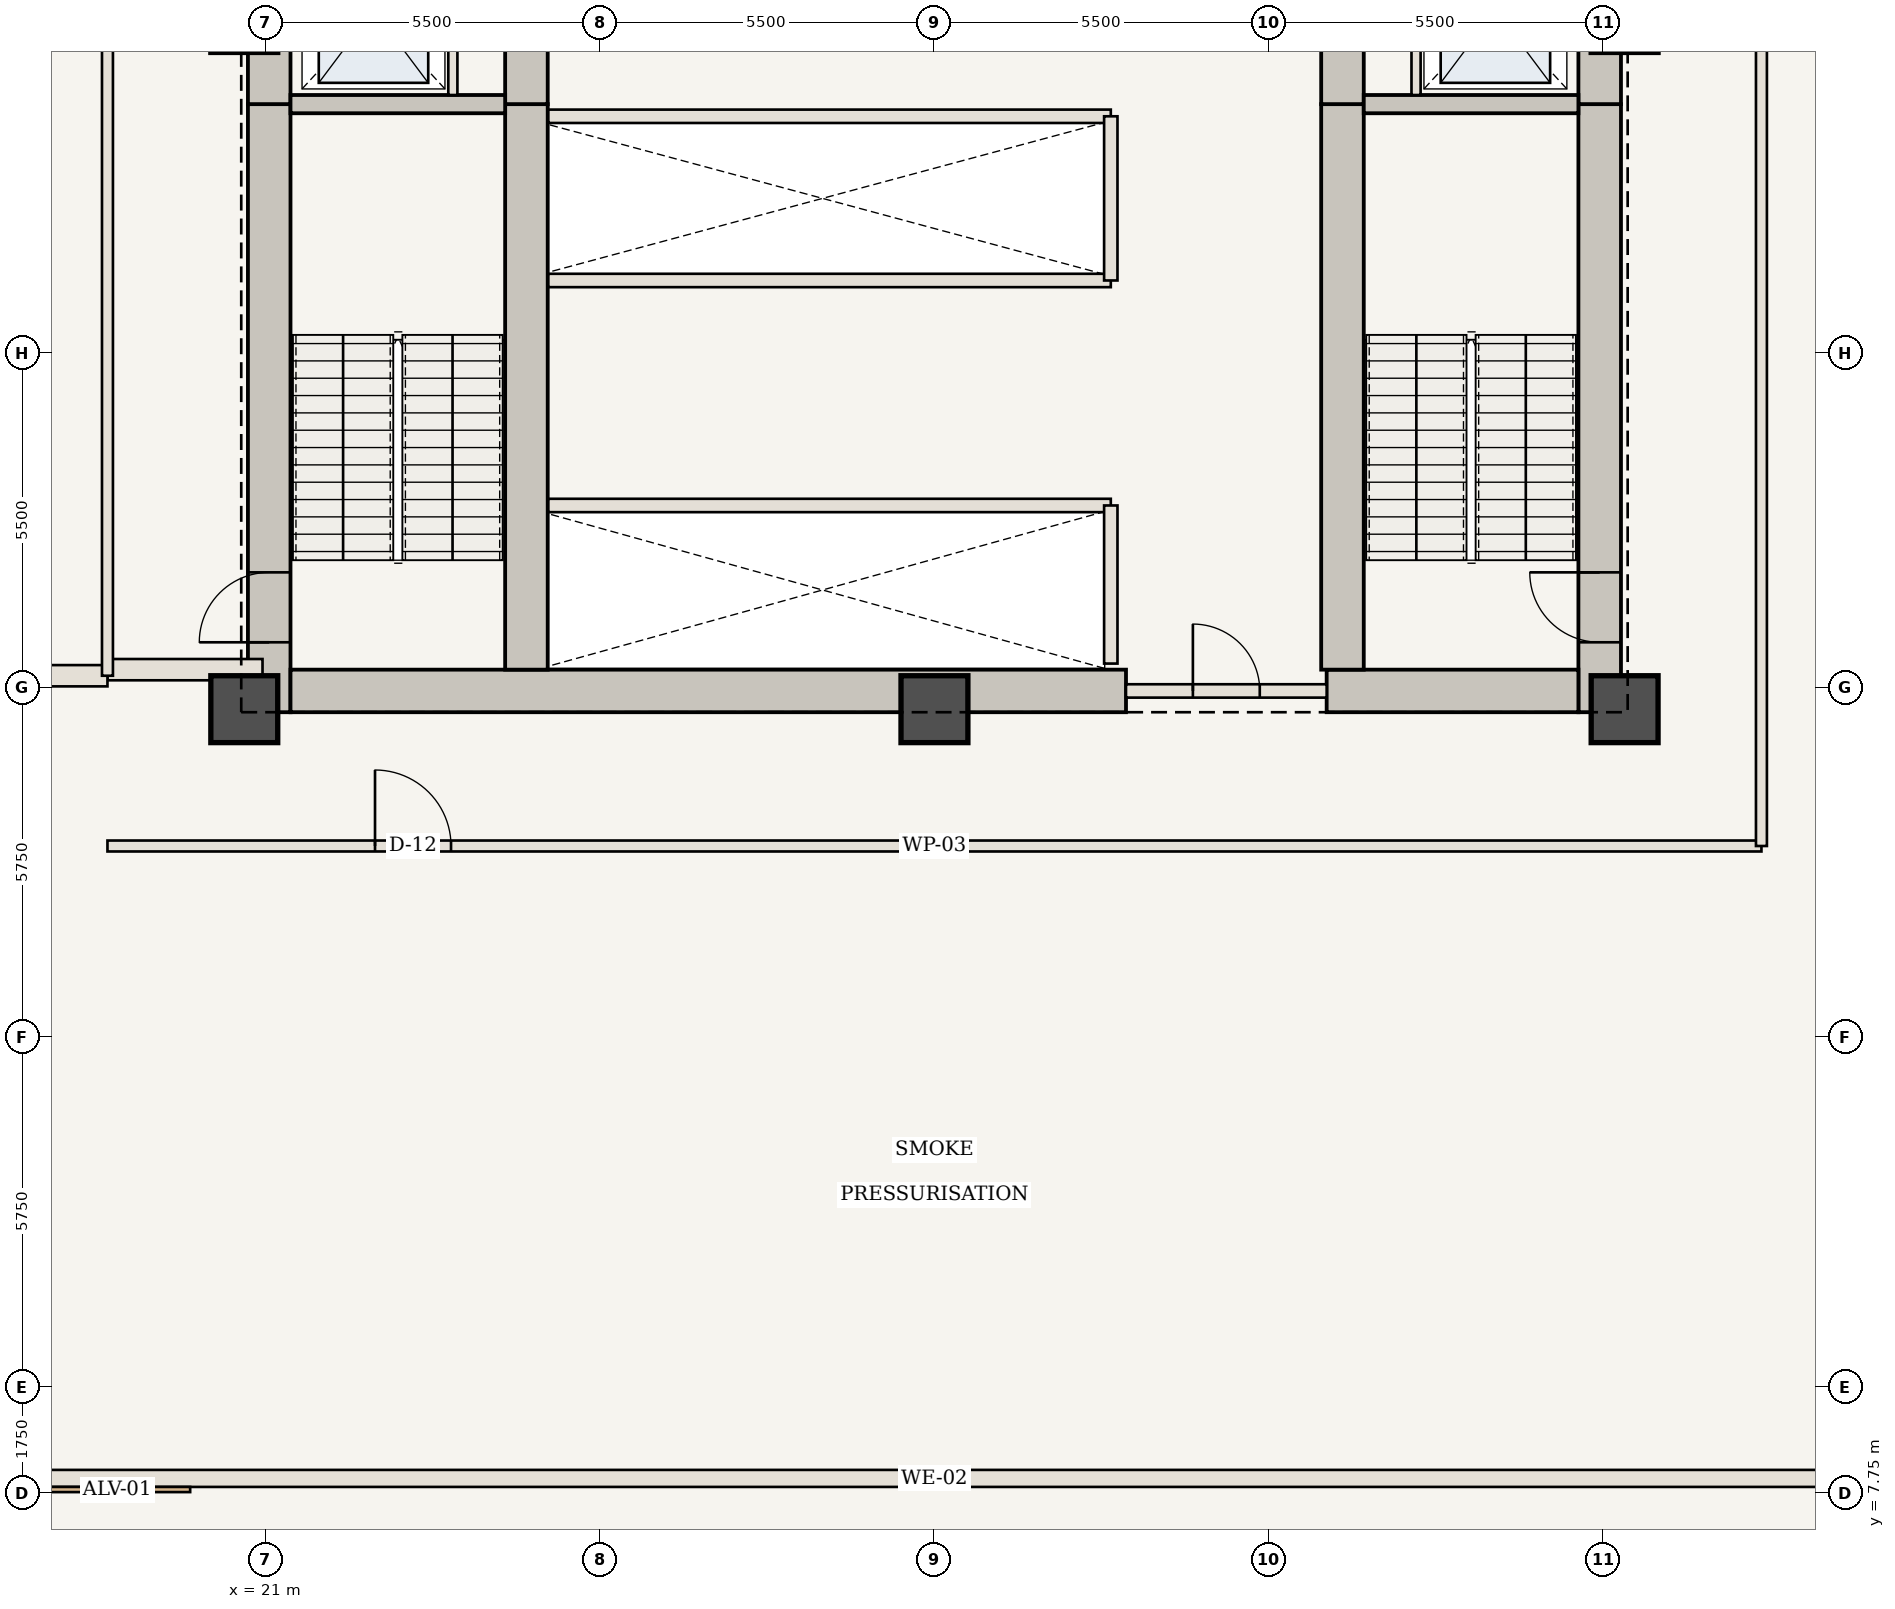
"""IFC4 building model, lengths in metres.
Left out: names, types, materials, properties, quantities, classifications, styles, units other than length and angle.
Written with IfcOpenShell. Run it as: python <this file> out.ifc"""

import sys

from ifc_helpers import new_model, si_unit, direction, frame, frame_2d, origin, origin_2d, place, context, subcontext, project, spatial, rectangle, extrude, element, fill, save


model = new_model("IFC4")
c1 = context("Model", 3, precision=1e-05, world=origin(), true_north=direction((0.0, 1.0)))
c2 = subcontext(c1, "Body", "Model", "MODEL_VIEW")
j1 = project(units=[si_unit("LENGTHUNIT", "METRE"), si_unit("PLANEANGLEUNIT", "RADIAN")], contexts=[c1])
p1 = place(None, origin())
s1 = spatial("IfcSite", under=j1, at=p1, CompositionType="ELEMENT")
p2 = place(p1, origin())
s2 = spatial("IfcBuilding", under=s1, at=p2, CompositionType="ELEMENT")
p3 = place(p2, frame((0.0, 0.0, 77.35)))
s3 = spatial("IfcBuildingStorey", under=s2, at=p3, CompositionType="ELEMENT", Elevation=77.35)
p4 = place(p3, frame((21.06, 20.6, 0.0), z_axis=(0.0, 0.0, 1.0), x_axis=(0.0, 1.0, 0.0)))
e1 = element("IfcWall", 1, at=p4, inside=s3, PredefinedType="SHEAR", context=c2, shape_type="SweptSolid", body=[
    extrude(rectangle(XDim=10.0, YDim=0.7, at=frame_2d((5.0, 0.0))), origin(), (0.0, 0.0, 1.0), 4.9),
])
p5 = place(p4, frame((1.15, 0.0, 0.0)))
e2 = element("IfcOpeningElement", 2, at=p5, cuts=e1, PredefinedType="OPENING", context=c2, shape_type="SweptSolid", body=[
    extrude(rectangle(XDim=1.15, YDim=2.15, at=frame_2d((0.575, 1.075))), frame((0.0, 0.36, 0.0), z_axis=(0.0, -1.0, 0.0), x_axis=(1.0, 0.0, 0.0)), (0.0, 0.0, 1.0), 0.72),
])
p6 = place(p3, frame((21.06, 30.6, 0.0), z_axis=(0.0, 0.0, 1.0), x_axis=(0.0, 1.0, 0.0)))
e3 = element("IfcWall", 3, at=p6, inside=s3, PredefinedType="SHEAR", context=c2, shape_type="SweptSolid", body=[
    extrude(rectangle(XDim=12.75, YDim=0.7, at=frame_2d((6.375, 0.0))), origin(), (0.0, 0.0, 1.0), 4.9),
])
p7 = place(p6, frame((4.2, 0.0, 0.0)))
e4 = element("IfcOpeningElement", 4, at=p7, cuts=e3, PredefinedType="OPENING", context=c2, shape_type="SweptSolid", body=[
    extrude(rectangle(XDim=1.1, YDim=2.15, at=frame_2d((0.55, 1.075))), frame((0.0, 0.36, 0.0), z_axis=(0.0, -1.0, 0.0), x_axis=(1.0, 0.0, 0.0)), (0.0, 0.0, 1.0), 0.72),
])
p8 = place(p6, frame((9.2, 0.0, 0.0)))
e5 = element("IfcOpeningElement", 5, at=p8, cuts=e3, PredefinedType="OPENING", context=c2, shape_type="SweptSolid", body=[
    extrude(rectangle(XDim=0.92, YDim=2.1, at=frame_2d((0.46, 1.05))), frame((0.0, 0.36, 0.0), z_axis=(0.0, -1.0, 0.0), x_axis=(1.0, 0.0, 0.0)), (0.0, 0.0, 1.0), 0.72),
])
p9 = place(p3, frame((42.94, 20.6, 0.0), z_axis=(0.0, 0.0, 1.0), x_axis=(0.0, 1.0, 0.0)))
e6 = element("IfcWall", 6, at=p9, inside=s3, PredefinedType="SHEAR", context=c2, shape_type="SweptSolid", body=[
    extrude(rectangle(XDim=10.0, YDim=0.7, at=frame_2d((5.0, 0.0))), origin(), (0.0, 0.0, 1.0), 4.9),
])
p10 = place(p9, frame((1.15, 0.0, 0.0)))
e7 = element("IfcOpeningElement", 7, at=p10, cuts=e6, PredefinedType="OPENING", context=c2, shape_type="SweptSolid", body=[
    extrude(rectangle(XDim=1.15, YDim=2.15, at=frame_2d((0.575, 1.075))), frame((0.0, 0.36, 0.0), z_axis=(0.0, -1.0, 0.0), x_axis=(1.0, 0.0, 0.0)), (0.0, 0.0, 1.0), 0.72),
])
p11 = place(p3, frame((42.94, 30.6, 0.0), z_axis=(0.0, 0.0, 1.0), x_axis=(0.0, 1.0, 0.0)))
e8 = element("IfcWall", 8, at=p11, inside=s3, PredefinedType="SHEAR", context=c2, shape_type="SweptSolid", body=[
    extrude(rectangle(XDim=12.75, YDim=0.7, at=frame_2d((6.375, 0.0))), origin(), (0.0, 0.0, 1.0), 4.9),
])
p12 = place(p11, frame((4.2, 0.0, 0.0)))
e9 = element("IfcOpeningElement", 9, at=p12, cuts=e8, PredefinedType="OPENING", context=c2, shape_type="SweptSolid", body=[
    extrude(rectangle(XDim=1.1, YDim=2.15, at=frame_2d((0.55, 1.075))), frame((0.0, 0.36, 0.0), z_axis=(0.0, -1.0, 0.0), x_axis=(1.0, 0.0, 0.0)), (0.0, 0.0, 1.0), 0.72),
])
p13 = place(p11, frame((8.4, 0.0, 0.0)))
e10 = element("IfcOpeningElement", 10, at=p13, cuts=e8, PredefinedType="OPENING", context=c2, shape_type="SweptSolid", body=[
    extrude(rectangle(XDim=0.88, YDim=2.1, at=frame_2d((0.44, 1.05))), frame((0.0, 0.36, 0.0), z_axis=(0.0, -1.0, 0.0), x_axis=(1.0, 0.0, 0.0)), (0.0, 0.0, 1.0), 0.72),
])
p14 = place(p11, frame((10.5, 0.0, 0.0)))
e11 = element("IfcOpeningElement", 11, at=p14, cuts=e8, PredefinedType="OPENING", context=c2, shape_type="SweptSolid", body=[
    extrude(rectangle(XDim=0.88, YDim=2.1, at=frame_2d((0.44, 1.05))), frame((0.0, 0.36, 0.0), z_axis=(0.0, -1.0, 0.0), x_axis=(1.0, 0.0, 0.0)), (0.0, 0.0, 1.0), 0.72),
])
p15 = place(p3, frame((21.41, 20.95, 0.0), z_axis=(0.0, 0.0, 1.0), x_axis=(1.0, 0.0, 0.0)))
e12 = element("IfcWall", 12, at=p15, inside=s3, PredefinedType="SHEAR", context=c2, shape_type="SweptSolid", body=[
    extrude(rectangle(XDim=13.74, YDim=0.7, at=frame_2d((6.87, 0.0))), origin(), (0.0, 0.0, 1.0), 4.9),
])
p16 = place(p3, frame((38.45, 20.95, 0.0), z_axis=(0.0, 0.0, 1.0), x_axis=(1.0, 0.0, 0.0)))
e13 = element("IfcWall", 13, at=p16, inside=s3, PredefinedType="SHEAR", context=c2, shape_type="SweptSolid", body=[
    extrude(rectangle(XDim=4.14, YDim=0.7, at=frame_2d((2.07, 0.0))), origin(), (0.0, 0.0, 1.0), 4.9),
])
p17 = place(p3, frame((25.29, 21.3, 0.0), z_axis=(0.0, 0.0, 1.0), x_axis=(0.0, 1.0, 0.0)))
e14 = element("IfcWall", 14, at=p17, inside=s3, PredefinedType="SHEAR", context=c2, shape_type="SweptSolid", body=[
    extrude(rectangle(XDim=9.3, YDim=0.7, at=frame_2d((4.65, 0.0))), origin(), (0.0, 0.0, 1.0), 4.9),
])
p18 = place(p3, frame((25.29, 30.6, 0.0), z_axis=(0.0, 0.0, 1.0), x_axis=(0.0, 1.0, 0.0)))
e15 = element("IfcWall", 15, at=p18, inside=s3, PredefinedType="SHEAR", context=c2, shape_type="SweptSolid", body=[
    extrude(rectangle(XDim=12.05, YDim=0.7, at=frame_2d((6.025, 0.0))), origin(), (0.0, 0.0, 1.0), 4.9),
])
p19 = place(p18, frame((6.25, 0.0, 0.0)))
e16 = element("IfcOpeningElement", 16, at=p19, cuts=e15, PredefinedType="OPENING", context=c2, shape_type="SweptSolid", body=[
    extrude(rectangle(XDim=1.1, YDim=2.15, at=frame_2d((0.55, 1.075))), frame((0.0, 0.36, 0.0), z_axis=(0.0, -1.0, 0.0), x_axis=(1.0, 0.0, 0.0)), (0.0, 0.0, 1.0), 0.72),
])
p20 = place(p3, frame((38.71, 21.3, 0.0), z_axis=(0.0, 0.0, 1.0), x_axis=(0.0, 1.0, 0.0)))
e17 = element("IfcWall", 17, at=p20, inside=s3, PredefinedType="SHEAR", context=c2, shape_type="SweptSolid", body=[
    extrude(rectangle(XDim=9.3, YDim=0.7, at=frame_2d((4.65, 0.0))), origin(), (0.0, 0.0, 1.0), 4.9),
])
p21 = place(p3, frame((38.71, 30.6, 0.0), z_axis=(0.0, 0.0, 1.0), x_axis=(0.0, 1.0, 0.0)))
e18 = element("IfcWall", 18, at=p21, inside=s3, PredefinedType="SHEAR", context=c2, shape_type="SweptSolid", body=[
    extrude(rectangle(XDim=12.05, YDim=0.7, at=frame_2d((6.025, 0.0))), origin(), (0.0, 0.0, 1.0), 4.9),
])
for number, where, z_axis, x_axis in (
    (19, (20.65, 20.65, 0.0), (0.0, 0.0, 1.0), (1.0, 0.0, 0.0)),
    (20, (32.0, 20.65, 0.0), (0.0, 0.0, 1.0), (1.0, 0.0, 0.0)),
    (21, (43.35, 20.65, 0.0), (0.0, 0.0, 1.0), (1.0, 0.0, 0.0)),
):
    element("IfcColumn", number, at=place(p3, frame(where, z_axis=z_axis, x_axis=x_axis)), inside=s3, PredefinedType="COLUMN", context=c2, shape_type="SweptSolid", body=[
        extrude(rectangle(XDim=1.1, YDim=1.1, at=origin_2d()), origin(), (0.0, 0.0, 1.0), 4.9),
    ])
for number, where, z_axis, x_axis in (
    (22, (21.41, 30.6, 0.0), (0.0, 0.0, 1.0), (1.0, 0.0, 0.0)),
    (23, (39.06, 30.6, 0.0), (0.0, 0.0, 1.0), (1.0, 0.0, 0.0)),
):
    element("IfcWall", number, at=place(p3, frame(where, z_axis=z_axis, x_axis=x_axis)), inside=s3, PredefinedType="SHEAR", context=c2, shape_type="SweptSolid", body=[
        extrude(rectangle(XDim=3.53, YDim=0.3, at=frame_2d((1.765, 0.0))), origin(), (0.0, 0.0, 1.0), 4.72),
    ])
for number, where, z_axis, x_axis in (
    (24, (24.08, 30.75, 0.0), (0.0, 0.0, 1.0), (0.0, 1.0, 0.0)),
    (25, (39.92, 30.75, 0.0), (0.0, 0.0, 1.0), (0.0, 1.0, 0.0)),
):
    element("IfcWall", number, at=place(p3, frame(where, z_axis=z_axis, x_axis=x_axis)), inside=s3, PredefinedType="STANDARD", context=c2, shape_type="SweptSolid", body=[
        extrude(rectangle(XDim=2.65, YDim=0.15, at=frame_2d((1.325, 0.0))), origin(), (0.0, 0.0, 1.0), 4.72),
    ])
p22 = place(p3, frame((35.15, 20.95, 0.0), z_axis=(0.0, 0.0, 1.0), x_axis=(1.0, 0.0, 0.0)))
e26 = element("IfcWall", 26, at=p22, inside=s3, PredefinedType="STANDARD", context=c2, shape_type="SweptSolid", body=[
    extrude(rectangle(XDim=3.3, YDim=0.22, at=frame_2d((1.65, 0.0))), origin(), (0.0, 0.0, 1.0), 4.72),
])
p23 = place(p22, frame((1.1, 0.0, 0.0)))
e27 = element("IfcOpeningElement", 27, at=p23, cuts=e26, PredefinedType="OPENING", context=c2, shape_type="SweptSolid", body=[
    extrude(rectangle(XDim=1.1, YDim=2.15, at=frame_2d((0.55, 1.075))), frame((0.0, 0.12, 0.0), z_axis=(0.0, -1.0, 0.0), x_axis=(1.0, 0.0, 0.0)), (0.0, 0.0, 1.0), 0.24),
])
p24 = place(p3, frame((25.65, 24.0, 0.0), z_axis=(0.0, 0.0, 1.0), x_axis=(1.0, 0.0, 0.0)))
e28 = element("IfcWall", 28, at=p24, inside=s3, PredefinedType="STANDARD", context=c2, shape_type="SweptSolid", body=[
    extrude(rectangle(XDim=9.25, YDim=0.22, at=frame_2d((4.625, 0.0))), origin(), (0.0, 0.0, 1.0), 4.72),
])
p25 = place(p3, frame((34.9, 21.4, 0.0), z_axis=(0.0, 0.0, 1.0), x_axis=(0.0, 1.0, 0.0)))
e29 = element("IfcWall", 29, at=p25, inside=s3, PredefinedType="STANDARD", context=c2, shape_type="SweptSolid", body=[
    extrude(rectangle(XDim=2.6, YDim=0.22, at=frame_2d((1.3, 0.0))), origin(), (0.0, 0.0, 1.0), 4.72),
])
for number, where, z_axis, x_axis in (
    (30, (25.65, 27.7, 0.0), (0.0, 0.0, 1.0), (1.0, 0.0, 0.0)),
    (31, (25.65, 30.4, 0.0), (0.0, 0.0, 1.0), (1.0, 0.0, 0.0)),
):
    element("IfcWall", number, at=place(p3, frame(where, z_axis=z_axis, x_axis=x_axis)), inside=s3, PredefinedType="STANDARD", context=c2, shape_type="SweptSolid", body=[
        extrude(rectangle(XDim=9.25, YDim=0.22, at=frame_2d((4.625, 0.0))), origin(), (0.0, 0.0, 1.0), 4.72),
    ])
p26 = place(p3, frame((34.9, 27.7, 0.0), z_axis=(0.0, 0.0, 1.0), x_axis=(0.0, 1.0, 0.0)))
e32 = element("IfcWall", 32, at=p26, inside=s3, PredefinedType="STANDARD", context=c2, shape_type="SweptSolid", body=[
    extrude(rectangle(XDim=2.7, YDim=0.22, at=frame_2d((1.35, 0.0))), origin(), (0.0, 0.0, 1.0), 4.72),
])
p27 = place(p3, frame((18.4, 21.3, 0.0), z_axis=(0.0, 0.0, 1.0), x_axis=(1.0, 0.0, 0.0)))
e33 = element("IfcWall", 33, at=p27, inside=s3, PredefinedType="STANDARD", context=c2, shape_type="SweptSolid", body=[
    extrude(rectangle(XDim=2.55, YDim=0.35, at=frame_2d((1.275, 0.0))), origin(), (0.0, 0.0, 1.0), 4.72),
])
p28 = place(p3, frame((18.4, 18.4, 0.0), z_axis=(0.0, 0.0, 1.0), x_axis=(1.0, 0.0, 0.0)))
e34 = element("IfcWall", 34, at=p28, inside=s3, PredefinedType="STANDARD", context=c2, shape_type="SweptSolid", body=[
    extrude(rectangle(XDim=27.2, YDim=0.18, at=frame_2d((13.6, 0.0))), origin(), (0.0, 0.0, 1.0), 4.72),
])
p29 = place(p28, frame((4.4, 0.0, 0.0)))
e35 = element("IfcOpeningElement", 35, at=p29, cuts=e34, PredefinedType="OPENING", context=c2, shape_type="SweptSolid", body=[
    extrude(rectangle(XDim=1.25, YDim=2.2, at=frame_2d((0.625, 1.1))), frame((0.0, 0.1, 0.0), z_axis=(0.0, -1.0, 0.0), x_axis=(1.0, 0.0, 0.0)), (0.0, 0.0, 1.0), 0.2),
])
p30 = place(p3, frame((8.05, 21.2, 0.0), z_axis=(0.0, 0.0, 1.0), x_axis=(1.0, 0.0, 0.0)))
e36 = element("IfcWall", 36, at=p30, inside=s3, PredefinedType="STANDARD", context=c2, shape_type="SweptSolid", body=[
    extrude(rectangle(XDim=10.35, YDim=0.35, at=frame_2d((5.175, 0.0))), origin(), (0.0, 0.0, 1.0), 4.72),
])
p31 = place(p3, frame((18.4, 21.2, 0.0), z_axis=(0.0, 0.0, 1.0), x_axis=(0.0, 1.0, 0.0)))
e37 = element("IfcWall", 37, at=p31, inside=s3, PredefinedType="STANDARD", context=c2, shape_type="SweptSolid", body=[
    extrude(rectangle(XDim=21.6, YDim=0.18, at=frame_2d((10.8, 0.0))), origin(), (0.0, 0.0, 1.0), 4.72),
])
p32 = place(p31, frame((11.75, 0.0, 0.0)))
e38 = element("IfcOpeningElement", 38, at=p32, cuts=e37, PredefinedType="OPENING", context=c2, shape_type="SweptSolid", body=[
    extrude(rectangle(XDim=1.1, YDim=2.15, at=frame_2d((0.55, 1.075))), frame((0.0, 0.1, 0.0), z_axis=(0.0, -1.0, 0.0), x_axis=(1.0, 0.0, 0.0)), (0.0, 0.0, 1.0), 0.2),
])
p33 = place(p3, frame((45.6, 18.4, 0.0), z_axis=(0.0, 0.0, 1.0), x_axis=(0.0, 1.0, 0.0)))
e39 = element("IfcWall", 39, at=p33, inside=s3, PredefinedType="STANDARD", context=c2, shape_type="SweptSolid", body=[
    extrude(rectangle(XDim=27.2, YDim=0.18, at=frame_2d((13.6, 0.0))), origin(), (0.0, 0.0, 1.0), 4.72),
])
p34 = place(p33, frame((14.55, 0.0, 0.0)))
e40 = element("IfcOpeningElement", 40, at=p34, cuts=e39, PredefinedType="OPENING", context=c2, shape_type="SweptSolid", body=[
    extrude(rectangle(XDim=1.25, YDim=2.2, at=frame_2d((0.625, 1.1))), frame((0.0, 0.1, 0.0), z_axis=(0.0, -1.0, 0.0), x_axis=(1.0, 0.0, 0.0)), (0.0, 0.0, 1.0), 0.2),
])
p35 = place(p3, frame((56.0, 8.0, 0.0), z_axis=(0.0, 0.0, 1.0), x_axis=(-1.0, 0.0, 0.0)))
e41 = element("IfcWall", 41, at=p35, inside=s3, PredefinedType="USERDEFINED", context=c2, shape_type="SweptSolid", body=[
    extrude(rectangle(XDim=48.0, YDim=0.28, at=frame_2d((24.0, 0.0))), origin(), (0.0, 0.0, 1.0), 3.92),
])
p36 = place(p5, origin())
e42 = element("IfcDoor", 42, at=p36, inside=s3, OperationType="SINGLE_SWING_LEFT", PredefinedType="DOOR", context=c2, shape_type="SweptSolid", body=[
    extrude(rectangle(XDim=1.15, YDim=2.15, at=frame_2d((0.575, 1.075))), frame((0.0, 0.025, 0.0), z_axis=(0.0, -1.0, 0.0), x_axis=(1.0, 0.0, 0.0)), (0.0, 0.0, 1.0), 0.05),
])
fill(e2, e42)
p37 = place(p10, origin())
e43 = element("IfcDoor", 43, at=p37, inside=s3, OperationType="SINGLE_SWING_RIGHT", PredefinedType="DOOR", context=c2, shape_type="SweptSolid", body=[
    extrude(rectangle(XDim=1.15, YDim=2.15, at=frame_2d((0.575, 1.075))), frame((0.0, 0.025, 0.0), z_axis=(0.0, -1.0, 0.0), x_axis=(1.0, 0.0, 0.0)), (0.0, 0.0, 1.0), 0.05),
])
fill(e7, e43)
p38 = place(p23, origin())
e44 = element("IfcDoor", 44, at=p38, inside=s3, OperationType="SINGLE_SWING_LEFT", PredefinedType="DOOR", context=c2, shape_type="SweptSolid", body=[
    extrude(rectangle(XDim=1.1, YDim=2.15, at=frame_2d((0.55, 1.075))), frame((0.0, 0.025, 0.0), z_axis=(0.0, -1.0, 0.0), x_axis=(1.0, 0.0, 0.0)), (0.0, 0.0, 1.0), 0.05),
])
fill(e27, e44)
p39 = place(p29, origin())
e45 = element("IfcDoor", 45, at=p39, inside=s3, OperationType="SINGLE_SWING_LEFT", PredefinedType="DOOR", context=c2, shape_type="SweptSolid", body=[
    extrude(rectangle(XDim=1.25, YDim=2.2, at=frame_2d((0.625, 1.1))), frame((0.0, 0.025, 0.0), z_axis=(0.0, -1.0, 0.0), x_axis=(1.0, 0.0, 0.0)), (0.0, 0.0, 1.0), 0.05),
])
fill(e35, e45)
save(model, sys.argv[1])
